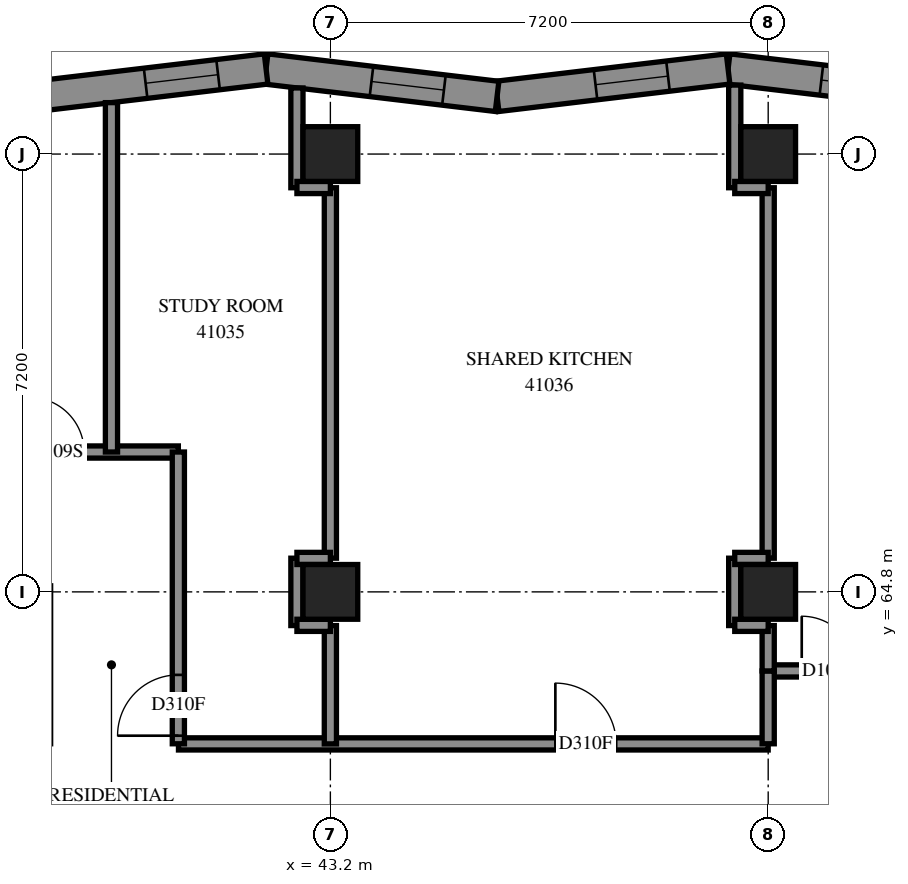
"""IFC4 building model, lengths in metres.
Left out: names, types, materials, properties, quantities, classifications, styles, units other than length and angle.
Written with IfcOpenShell. Run it as: python <this file> out.ifc"""

import sys

from ifc_helpers import new_model, si_unit, direction, frame, frame_2d, origin, origin_2d, place, context, subcontext, project, spatial, polyline, rectangle, outline, extrude, element, fill, save


model = new_model("IFC4")
c1 = context("Model", 3, precision=1e-05, world=origin(), true_north=direction((0.0, 1.0)))
c2 = subcontext(c1, "Body", "Model", "MODEL_VIEW")
j1 = project(units=[si_unit("LENGTHUNIT", "METRE"), si_unit("PLANEANGLEUNIT", "RADIAN")], contexts=[c1])
p1 = place(None, origin())
s1 = spatial("IfcSite", under=j1, at=p1, CompositionType="ELEMENT")
p2 = place(p1, origin())
s2 = spatial("IfcBuilding", under=s1, at=p2, CompositionType="ELEMENT")
p3 = place(p2, frame((0.0, 0.0, 152.4)))
s3 = spatial("IfcBuildingStorey", under=s2, at=p3, CompositionType="ELEMENT", Elevation=152.4)
for number, where, z_axis, x_axis in (
    (1, (43.2, 64.8, 0.0), (0.0, 0.0, 1.0), (1.0, 0.0, 0.0)),
    (2, (43.2, 72.0, 0.0), (0.0, 0.0, 1.0), (1.0, 0.0, 0.0)),
    (3, (50.4, 64.8, 0.0), (0.0, 0.0, 1.0), (1.0, 0.0, 0.0)),
    (4, (50.4, 72.0, 0.0), (0.0, 0.0, 1.0), (1.0, 0.0, 0.0)),
):
    element("IfcColumn", number, at=place(p3, frame(where, z_axis=z_axis, x_axis=x_axis)), inside=s3, PredefinedType="COLUMN", context=c2, shape_type="SweptSolid", body=[
        extrude(rectangle(XDim=0.9, YDim=0.9, at=origin_2d()), origin(), (0.0, 0.0, 1.0), 3.1),
    ])
p4 = place(p3, frame((53.54, 72.948, 0.0), z_axis=(0.0, 0.0, 1.0), x_axis=(-0.9930269402, 0.1178876415, 0.0)))
e5 = element("IfcWall", 5, at=p4, inside=s3, PredefinedType="SOLIDWALL", context=c2, shape_type="SweptSolid", body=[
    extrude(outline(polyline([(0.03, -0.25), (3.855, -0.25), (3.796, 0.25), (-0.03, 0.25), (0.03, -0.25)])), origin(), (0.0, 0.0, 1.0), 3.1),
])
p5 = place(p4, frame((1.081, 0.0, 0.45)))
e6 = element("IfcOpeningElement", 6, at=p5, cuts=e5, PredefinedType="OPENING", context=c2, shape_type="SweptSolid", body=[
    extrude(rectangle(XDim=1.2, YDim=2.5, at=frame_2d((0.6, 1.25))), frame((0.0, 0.26, 0.0), z_axis=(0.0, -1.0, 0.0), x_axis=(1.0, 0.0, 0.0)), (0.0, 0.0, 1.0), 0.52),
])
p6 = place(p3, frame((49.741, 73.399, 0.0), z_axis=(0.0, 0.0, 1.0), x_axis=(-0.9930265769, -0.1178907016, 0.0)))
e7 = element("IfcWall", 7, at=p6, inside=s3, PredefinedType="SOLIDWALL", context=c2, shape_type="SweptSolid", body=[
    extrude(outline(polyline([(-0.03, -0.25), (3.796, -0.25), (3.855, 0.25), (0.03, 0.25), (-0.03, -0.25)])), origin(), (0.0, 0.0, 1.0), 3.1),
])
p7 = place(p6, frame((0.996, 0.0, 0.45)))
e8 = element("IfcOpeningElement", 8, at=p7, cuts=e7, PredefinedType="OPENING", context=c2, shape_type="SweptSolid", body=[
    extrude(rectangle(XDim=1.2, YDim=2.5, at=frame_2d((0.6, 1.25))), frame((0.0, 0.26, 0.0), z_axis=(0.0, -1.0, 0.0), x_axis=(1.0, 0.0, 0.0)), (0.0, 0.0, 1.0), 0.52),
])
p8 = place(p3, frame((45.942, 72.948, 0.0), z_axis=(0.0, 0.0, 1.0), x_axis=(-0.9930269402, 0.1178876415, 0.0)))
e9 = element("IfcWall", 9, at=p8, inside=s3, PredefinedType="SOLIDWALL", context=c2, shape_type="SweptSolid", body=[
    extrude(outline(polyline([(0.03, -0.25), (3.855, -0.25), (3.796, 0.25), (-0.03, 0.25), (0.03, -0.25)])), origin(), (0.0, 0.0, 1.0), 3.1),
])
p9 = place(p8, frame((0.88, 0.0, 0.45)))
e10 = element("IfcOpeningElement", 10, at=p9, cuts=e9, PredefinedType="OPENING", context=c2, shape_type="SweptSolid", body=[
    extrude(rectangle(XDim=1.2, YDim=2.5, at=frame_2d((0.6, 1.25))), frame((0.0, 0.26, 0.0), z_axis=(0.0, -1.0, 0.0), x_axis=(1.0, 0.0, 0.0)), (0.0, 0.0, 1.0), 0.52),
])
p10 = place(p3, frame((42.143, 73.399, 0.0), z_axis=(0.0, 0.0, 1.0), x_axis=(-0.9930269402, -0.1178876415, 0.0)))
e11 = element("IfcWall", 11, at=p10, inside=s3, PredefinedType="SOLIDWALL", context=c2, shape_type="SweptSolid", body=[
    extrude(outline(polyline([(-0.03, -0.25), (3.796, -0.25), (3.855, 0.25), (0.03, 0.25), (-0.03, -0.25)])), origin(), (0.0, 0.0, 1.0), 3.1),
])
p11 = place(p10, frame((0.795, 0.0, 0.45)))
e12 = element("IfcOpeningElement", 12, at=p11, cuts=e11, PredefinedType="OPENING", context=c2, shape_type="SweptSolid", body=[
    extrude(rectangle(XDim=1.2, YDim=2.5, at=frame_2d((0.6, 1.25))), frame((0.0, 0.26, 0.0), z_axis=(0.0, -1.0, 0.0), x_axis=(1.0, 0.0, 0.0)), (0.0, 0.0, 1.0), 0.52),
])
p12 = place(p3, frame((21.602, 67.1, 0.0), z_axis=(0.0, 0.0, 1.0), x_axis=(1.0, 0.0, 0.0)))
e13 = element("IfcWall", 13, at=p12, inside=s3, PredefinedType="PARTITIONING", context=c2, shape_type="SweptSolid", body=[
    extrude(rectangle(XDim=19.098, YDim=0.2, at=frame_2d((9.549, 0.0))), origin(), (0.0, 0.0, 1.0), 3.1),
])
p13 = place(p12, frame((3.998, 0.0, 0.0)))
e14 = element("IfcOpeningElement", 14, at=p13, cuts=e13, PredefinedType="OPENING", context=c2, shape_type="SweptSolid", body=[
    extrude(rectangle(XDim=0.9, YDim=2.1, at=frame_2d((0.45, 1.05))), frame((0.0, 0.11, 0.0), z_axis=(0.0, -1.0, 0.0), x_axis=(1.0, 0.0, 0.0)), (0.0, 0.0, 1.0), 0.22),
])
p14 = place(p12, frame((11.399, 0.0, 0.0)))
e15 = element("IfcOpeningElement", 15, at=p14, cuts=e13, PredefinedType="OPENING", context=c2, shape_type="SweptSolid", body=[
    extrude(rectangle(XDim=0.9, YDim=2.1, at=frame_2d((0.45, 1.05))), frame((0.0, 0.11, 0.0), z_axis=(0.0, -1.0, 0.0), x_axis=(1.0, 0.0, 0.0)), (0.0, 0.0, 1.0), 0.22),
])
p15 = place(p12, frame((16.648, 0.0, 0.0)))
e16 = element("IfcOpeningElement", 16, at=p15, cuts=e13, PredefinedType="OPENING", context=c2, shape_type="SweptSolid", body=[
    extrude(rectangle(XDim=0.9, YDim=2.1, at=frame_2d((0.45, 1.05))), frame((0.0, 0.11, 0.0), z_axis=(0.0, -1.0, 0.0), x_axis=(1.0, 0.0, 0.0)), (0.0, 0.0, 1.0), 0.22),
])
p16 = place(p3, frame((40.702, 62.3, 0.0), z_axis=(0.0, 0.0, 1.0), x_axis=(1.0, 0.0, 0.0)))
e17 = element("IfcWall", 17, at=p16, inside=s3, PredefinedType="PARTITIONING", context=c2, shape_type="SweptSolid", body=[
    extrude(rectangle(XDim=9.698, YDim=0.2, at=frame_2d((4.849, 0.0))), origin(), (0.0, 0.0, 1.0), 3.1),
])
p17 = place(p16, frame((6.198, 0.0, 0.0)))
e18 = element("IfcOpeningElement", 18, at=p17, cuts=e17, PredefinedType="OPENING", context=c2, shape_type="SweptSolid", body=[
    extrude(rectangle(XDim=1.0, YDim=2.1, at=frame_2d((0.5, 1.05))), frame((0.0, 0.11, 0.0), z_axis=(0.0, -1.0, 0.0), x_axis=(1.0, 0.0, 0.0)), (0.0, 0.0, 1.0), 0.22),
])
for number, where, z_axis, x_axis in (
    (19, (43.2, 65.354, 0.0), (0.0, 0.0, 1.0), (0.0, 1.0, 0.0)),
    (20, (50.4, 65.354, 0.0), (0.0, 0.0, 1.0), (0.0, 1.0, 0.0)),
):
    element("IfcWall", number, at=place(p3, frame(where, z_axis=z_axis, x_axis=x_axis)), inside=s3, PredefinedType="PARTITIONING", context=c2, shape_type="SweptSolid", body=[
        extrude(rectangle(XDim=6.092, YDim=0.2, at=frame_2d((3.046, 0.0))), origin(), (0.0, 0.0, 1.0), 3.1),
    ])
p18 = place(p3, frame((39.6, 67.1, 0.0), z_axis=(0.0, 0.0, 1.0), x_axis=(0.0, 1.0, 0.0)))
e21 = element("IfcWall", 21, at=p18, inside=s3, PredefinedType="PARTITIONING", context=c2, shape_type="SweptSolid", body=[
    extrude(rectangle(XDim=5.746, YDim=0.2, at=frame_2d((2.873, 0.0))), origin(), (0.0, 0.0, 1.0), 3.1),
])
p19 = place(p3, frame((50.4, 63.5, 0.0), z_axis=(0.0, 0.0, 1.0), x_axis=(1.0, 0.0, 0.0)))
e22 = element("IfcWall", 22, at=p19, inside=s3, PredefinedType="PARTITIONING", context=c2, shape_type="SweptSolid", body=[
    extrude(rectangle(XDim=5.1, YDim=0.2, at=frame_2d((2.55, 0.0))), origin(), (0.0, 0.0, 1.0), 3.1),
])
p20 = place(p19, frame((0.552, 0.0, 0.0)))
e23 = element("IfcOpeningElement", 23, at=p20, cuts=e22, PredefinedType="OPENING", context=c2, shape_type="SweptSolid", body=[
    extrude(rectangle(XDim=0.9, YDim=2.1, at=frame_2d((0.45, 1.05))), frame((0.0, 0.11, 0.0), z_axis=(0.0, -1.0, 0.0), x_axis=(1.0, 0.0, 0.0)), (0.0, 0.0, 1.0), 0.22),
])
p21 = place(p19, frame((3.941, 0.0, 0.0)))
e24 = element("IfcOpeningElement", 24, at=p21, cuts=e22, PredefinedType="OPENING", context=c2, shape_type="SweptSolid", body=[
    extrude(rectangle(XDim=1.0, YDim=2.1, at=frame_2d((0.5, 1.05))), frame((0.0, 0.11, 0.0), z_axis=(0.0, -1.0, 0.0), x_axis=(1.0, 0.0, 0.0)), (0.0, 0.0, 1.0), 0.22),
])
p22 = place(p3, frame((40.7, 62.302, 0.0), z_axis=(0.0, 0.0, 1.0), x_axis=(0.0, 1.0, 0.0)))
e25 = element("IfcWall", 25, at=p22, inside=s3, PredefinedType="PARTITIONING", context=c2, shape_type="SweptSolid", body=[
    extrude(rectangle(XDim=4.798, YDim=0.2, at=frame_2d((2.399, 0.0))), origin(), (0.0, 0.0, 1.0), 3.1),
])
p23 = place(p22, frame((0.133, 0.0, 0.0)))
e26 = element("IfcOpeningElement", 26, at=p23, cuts=e25, PredefinedType="OPENING", context=c2, shape_type="SweptSolid", body=[
    extrude(rectangle(XDim=1.0, YDim=2.1, at=frame_2d((0.5, 1.05))), frame((0.0, 0.11, 0.0), z_axis=(0.0, -1.0, 0.0), x_axis=(1.0, 0.0, 0.0)), (0.0, 0.0, 1.0), 0.22),
])
p24 = place(p3, frame((43.2, 62.3, 0.0), z_axis=(0.0, 0.0, 1.0), x_axis=(0.0, 1.0, 0.0)))
e27 = element("IfcWall", 27, at=p24, inside=s3, PredefinedType="PARTITIONING", context=c2, shape_type="SweptSolid", body=[
    extrude(rectangle(XDim=1.946, YDim=0.2, at=frame_2d((0.973, 0.0))), origin(), (0.0, 0.0, 1.0), 3.1),
])
p25 = place(p3, frame((49.85, 71.446, 0.0), z_axis=(0.0, 0.0, 1.0), x_axis=(0.0, 1.0, 0.0)))
e28 = element("IfcWall", 28, at=p25, inside=s3, PredefinedType="PARTITIONING", context=c2, shape_type="SweptSolid", body=[
    extrude(rectangle(XDim=1.688, YDim=0.2, at=frame_2d((0.844, 0.0))), origin(), (0.0, 0.0, 1.0), 3.1),
])
p26 = place(p3, frame((42.65, 71.446, 0.0), z_axis=(0.0, 0.0, 1.0), x_axis=(0.0, 1.0, 0.0)))
e29 = element("IfcWall", 29, at=p26, inside=s3, PredefinedType="PARTITIONING", context=c2, shape_type="SweptSolid", body=[
    extrude(rectangle(XDim=1.641, YDim=0.2, at=frame_2d((0.821, 0.0))), origin(), (0.0, 0.0, 1.0), 3.1),
])
p27 = place(p3, frame((50.4, 62.302, 0.0), z_axis=(0.0, 0.0, 1.0), x_axis=(0.0, 1.0, 0.0)))
e30 = element("IfcWall", 30, at=p27, inside=s3, PredefinedType="PARTITIONING", context=c2, shape_type="SweptSolid", body=[
    extrude(rectangle(XDim=1.198, YDim=0.2, at=frame_2d((0.599, 0.0))), origin(), (0.0, 0.0, 1.0), 3.1),
])
for number, where, z_axis, x_axis in (
    (31, (42.65, 64.246, 0.0), (0.0, 0.0, 1.0), (0.0, 1.0, 0.0)),
    (32, (49.85, 64.246, 0.0), (0.0, 0.0, 1.0), (0.0, 1.0, 0.0)),
):
    element("IfcWall", number, at=place(p3, frame(where, z_axis=z_axis, x_axis=x_axis)), inside=s3, PredefinedType="PARTITIONING", context=c2, shape_type="SweptSolid", body=[
        extrude(rectangle(XDim=1.108, YDim=0.2, at=frame_2d((0.554, 0.0))), origin(), (0.0, 0.0, 1.0), 3.1),
    ])
p28 = place(p3, frame((50.4, 63.5, 0.0), z_axis=(0.0, 0.0, 1.0), x_axis=(0.0, 1.0, 0.0)))
e33 = element("IfcWall", 33, at=p28, inside=s3, PredefinedType="PARTITIONING", context=c2, shape_type="SweptSolid", body=[
    extrude(rectangle(XDim=0.746, YDim=0.2, at=frame_2d((0.373, 0.0))), origin(), (0.0, 0.0, 1.0), 3.1),
])
for number, where, z_axis, x_axis in (
    (34, (42.65, 71.45, 0.0), (0.0, 0.0, 1.0), (1.0, 0.0, 0.0)),
    (35, (42.65, 65.35, 0.0), (0.0, 0.0, 1.0), (1.0, 0.0, 0.0)),
    (36, (42.65, 64.25, 0.0), (0.0, 0.0, 1.0), (1.0, 0.0, 0.0)),
    (37, (49.85, 71.45, 0.0), (0.0, 0.0, 1.0), (1.0, 0.0, 0.0)),
    (38, (49.85, 65.35, 0.0), (0.0, 0.0, 1.0), (1.0, 0.0, 0.0)),
    (39, (49.85, 64.25, 0.0), (0.0, 0.0, 1.0), (1.0, 0.0, 0.0)),
):
    element("IfcWall", number, at=place(p3, frame(where, z_axis=z_axis, x_axis=x_axis)), inside=s3, PredefinedType="PARTITIONING", context=c2, shape_type="SweptSolid", body=[
        extrude(rectangle(XDim=0.55, YDim=0.2, at=frame_2d((0.275, 0.0))), origin(), (0.0, 0.0, 1.0), 3.1),
    ])
p29 = place(p5, origin())
e40 = element("IfcWindow", 40, at=p29, inside=s3, PartitioningType="SINGLE_PANEL", PredefinedType="WINDOW", context=c2, shape_type="SweptSolid", body=[
    extrude(rectangle(XDim=1.2, YDim=2.5, at=frame_2d((0.6, 1.25))), frame((0.0, 0.18, 0.0), z_axis=(0.0, -1.0, 0.0), x_axis=(1.0, 0.0, 0.0)), (0.0, 0.0, 1.0), 0.06),
])
fill(e6, e40)
p30 = place(p7, origin())
e41 = element("IfcWindow", 41, at=p30, inside=s3, PartitioningType="SINGLE_PANEL", PredefinedType="WINDOW", context=c2, shape_type="SweptSolid", body=[
    extrude(rectangle(XDim=1.2, YDim=2.5, at=frame_2d((0.6, 1.25))), frame((0.0, 0.18, 0.0), z_axis=(0.0, -1.0, 0.0), x_axis=(1.0, 0.0, 0.0)), (0.0, 0.0, 1.0), 0.06),
])
fill(e8, e41)
p31 = place(p9, origin())
e42 = element("IfcWindow", 42, at=p31, inside=s3, PartitioningType="SINGLE_PANEL", PredefinedType="WINDOW", context=c2, shape_type="SweptSolid", body=[
    extrude(rectangle(XDim=1.2, YDim=2.5, at=frame_2d((0.6, 1.25))), frame((0.0, 0.18, 0.0), z_axis=(0.0, -1.0, 0.0), x_axis=(1.0, 0.0, 0.0)), (0.0, 0.0, 1.0), 0.06),
])
fill(e10, e42)
p32 = place(p11, origin())
e43 = element("IfcWindow", 43, at=p32, inside=s3, PartitioningType="SINGLE_PANEL", PredefinedType="WINDOW", context=c2, shape_type="SweptSolid", body=[
    extrude(rectangle(XDim=1.2, YDim=2.5, at=frame_2d((0.6, 1.25))), frame((0.0, 0.18, 0.0), z_axis=(0.0, -1.0, 0.0), x_axis=(1.0, 0.0, 0.0)), (0.0, 0.0, 1.0), 0.06),
])
fill(e12, e43)
p33 = place(p15, origin())
e44 = element("IfcDoor", 44, at=p33, inside=s3, OperationType="SINGLE_SWING_RIGHT", PredefinedType="DOOR", context=c2, shape_type="SweptSolid", body=[
    extrude(rectangle(XDim=0.9, YDim=2.1, at=frame_2d((0.45, 1.05))), frame((0.0, 0.025, 0.0), z_axis=(0.0, -1.0, 0.0), x_axis=(1.0, 0.0, 0.0)), (0.0, 0.0, 1.0), 0.05),
])
fill(e16, e44)
p34 = place(p23, origin())
e45 = element("IfcDoor", 45, at=p34, inside=s3, OperationType="SINGLE_SWING_LEFT", PredefinedType="DOOR", context=c2, shape_type="SweptSolid", body=[
    extrude(rectangle(XDim=1.0, YDim=2.1, at=frame_2d((0.5, 1.05))), frame((0.0, 0.025, 0.0), z_axis=(0.0, -1.0, 0.0), x_axis=(1.0, 0.0, 0.0)), (0.0, 0.0, 1.0), 0.05),
])
fill(e26, e45)
p35 = place(p17, origin())
e46 = element("IfcDoor", 46, at=p35, inside=s3, OperationType="SINGLE_SWING_RIGHT", PredefinedType="DOOR", context=c2, shape_type="SweptSolid", body=[
    extrude(rectangle(XDim=1.0, YDim=2.1, at=frame_2d((0.5, 1.05))), frame((0.0, 0.025, 0.0), z_axis=(0.0, -1.0, 0.0), x_axis=(1.0, 0.0, 0.0)), (0.0, 0.0, 1.0), 0.05),
])
fill(e18, e46)
p36 = place(p20, origin())
e47 = element("IfcDoor", 47, at=p36, inside=s3, OperationType="SINGLE_SWING_RIGHT", PredefinedType="DOOR", context=c2, shape_type="SweptSolid", body=[
    extrude(rectangle(XDim=0.9, YDim=2.1, at=frame_2d((0.45, 1.05))), frame((0.0, 0.025, 0.0), z_axis=(0.0, -1.0, 0.0), x_axis=(1.0, 0.0, 0.0)), (0.0, 0.0, 1.0), 0.05),
])
fill(e23, e47)
save(model, sys.argv[1])
